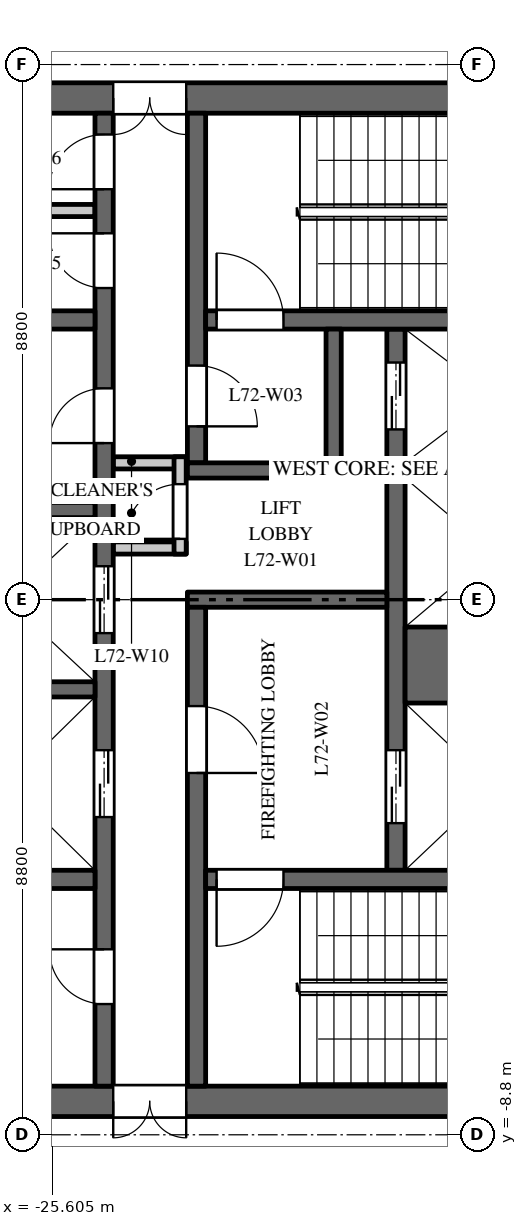
"""IFC4 building model, lengths in metres.
Left out: names, types, materials, properties, quantities, classifications, styles, units other than length and angle.
Written with IfcOpenShell. Run it as: python <this file> out.ifc"""

import sys

from ifc_helpers import new_model, si_unit, direction, frame, frame_2d, origin, place, context, subcontext, project, spatial, rectangle, extrude, element, fill, save


model = new_model("IFC4")
c1 = context("Model", 3, precision=1e-05, world=origin(), true_north=direction((0.0, 1.0)))
c2 = subcontext(c1, "Body", "Model", "MODEL_VIEW")
j1 = project(units=[si_unit("LENGTHUNIT", "METRE"), si_unit("PLANEANGLEUNIT", "RADIAN")], contexts=[c1])
p1 = place(None, origin())
s1 = spatial("IfcSite", under=j1, at=p1, CompositionType="ELEMENT")
p2 = place(p1, origin())
s2 = spatial("IfcBuilding", under=s1, at=p2, CompositionType="ELEMENT")
p3 = place(p2, frame((0.0, 0.0, 331.0)))
s3 = spatial("IfcBuildingStorey", under=s2, at=p3, CompositionType="ELEMENT", Elevation=331.0)
p4 = place(p3, frame((-16.5, 8.25, 0.0), z_axis=(0.0, 0.0, 1.0), x_axis=(-1.0, 0.0, 0.0)))
e1 = element("IfcWall", 1, at=p4, inside=s3, PredefinedType="SHEAR", context=c2, shape_type="SweptSolid", body=[
    extrude(rectangle(XDim=15.5, YDim=0.5, at=frame_2d((7.75, 0.0))), origin(), (0.0, 0.0, 1.0), 3.7),
])
p5 = place(p4, frame((6.9, 0.0, 0.0)))
e2 = element("IfcOpeningElement", 2, at=p5, cuts=e1, PredefinedType="OPENING", context=c2, shape_type="SweptSolid", body=[
    extrude(rectangle(XDim=1.2, YDim=2.1, at=frame_2d((0.6, 1.05))), frame((0.0, 0.26, 0.0), z_axis=(0.0, -1.0, 0.0), x_axis=(1.0, 0.0, 0.0)), (0.0, 0.0, 1.0), 0.52),
])
p6 = place(p4, frame((12.275, 0.0, 0.0)))
e3 = element("IfcOpeningElement", 3, at=p6, cuts=e1, PredefinedType="OPENING", context=c2, shape_type="SweptSolid", body=[
    extrude(rectangle(XDim=0.9, YDim=2.1, at=frame_2d((0.45, 1.05))), frame((0.0, 0.26, 0.0), z_axis=(0.0, -1.0, 0.0), x_axis=(1.0, 0.0, 0.0)), (0.0, 0.0, 1.0), 0.52),
])
p7 = place(p3, frame((-16.5, -8.25, 0.0), z_axis=(0.0, 0.0, 1.0), x_axis=(-1.0, 0.0, 0.0)))
e4 = element("IfcWall", 4, at=p7, inside=s3, PredefinedType="SHEAR", context=c2, shape_type="SweptSolid", body=[
    extrude(rectangle(XDim=15.5, YDim=0.5, at=frame_2d((7.75, 0.0))), origin(), (0.0, 0.0, 1.0), 3.7),
])
p8 = place(p7, frame((6.9, 0.0, 0.0)))
e5 = element("IfcOpeningElement", 5, at=p8, cuts=e4, PredefinedType="OPENING", context=c2, shape_type="SweptSolid", body=[
    extrude(rectangle(XDim=1.2, YDim=2.1, at=frame_2d((0.6, 1.05))), frame((0.0, 0.26, 0.0), z_axis=(0.0, -1.0, 0.0), x_axis=(1.0, 0.0, 0.0)), (0.0, 0.0, 1.0), 0.52),
])
p9 = place(p7, frame((12.425, 0.0, 0.0)))
e6 = element("IfcOpeningElement", 6, at=p9, cuts=e4, PredefinedType="OPENING", context=c2, shape_type="SweptSolid", body=[
    extrude(rectangle(XDim=0.9, YDim=2.1, at=frame_2d((0.45, 1.05))), frame((0.0, 0.26, 0.0), z_axis=(0.0, -1.0, 0.0), x_axis=(1.0, 0.0, 0.0)), (0.0, 0.0, 1.0), 0.52),
])
p10 = place(p3, frame((-19.95, -4.45, 0.0), z_axis=(0.0, 0.0, 1.0), x_axis=(0.0, 1.0, 0.0)))
e7 = element("IfcWall", 7, at=p10, inside=s3, PredefinedType="SHEAR", context=c2, shape_type="SweptSolid", body=[
    extrude(rectangle(XDim=8.9, YDim=0.3, at=frame_2d((4.45, 0.0))), origin(), (0.0, 0.0, 1.0), 3.7),
])
p11 = place(p10, frame((0.775, 0.0, 0.0)))
e8 = element("IfcOpeningElement", 8, at=p11, cuts=e7, PredefinedType="OPENING", context=c2, shape_type="SweptSolid", body=[
    extrude(rectangle(XDim=1.2, YDim=2.1, at=frame_2d((0.6, 1.05))), frame((0.0, 0.16, 0.0), z_axis=(0.0, -1.0, 0.0), x_axis=(1.0, 0.0, 0.0)), (0.0, 0.0, 1.0), 0.32),
])
p12 = place(p10, frame((7.25, 0.0, 0.0)))
e9 = element("IfcOpeningElement", 9, at=p12, cuts=e7, PredefinedType="OPENING", context=c2, shape_type="SweptSolid", body=[
    extrude(rectangle(XDim=1.1, YDim=2.1, at=frame_2d((0.55, 1.05))), frame((0.0, 0.16, 0.0), z_axis=(0.0, -1.0, 0.0), x_axis=(1.0, 0.0, 0.0)), (0.0, 0.0, 1.0), 0.32),
])
p13 = place(p3, frame((-24.75, -8.0, 0.0), z_axis=(0.0, 0.0, 1.0), x_axis=(0.0, 1.0, 0.0)))
e10 = element("IfcWall", 10, at=p13, inside=s3, PredefinedType="SHEAR", context=c2, shape_type="SweptSolid", body=[
    extrude(rectangle(XDim=16.0, YDim=0.3, at=frame_2d((8.0, 0.0))), origin(), (0.0, 0.0, 1.0), 3.7),
])
p14 = place(p13, frame((4.425, 0.0, 0.0)))
e11 = element("IfcOpeningElement", 11, at=p14, cuts=e10, PredefinedType="OPENING", context=c2, shape_type="SweptSolid", body=[
    extrude(rectangle(XDim=1.1, YDim=2.1, at=frame_2d((0.55, 1.05))), frame((0.0, 0.16, 0.0), z_axis=(0.0, -1.0, 0.0), x_axis=(1.0, 0.0, 0.0)), (0.0, 0.0, 1.0), 0.32),
])
p15 = place(p13, frame((7.45, 0.0, 0.0)))
e12 = element("IfcOpeningElement", 12, at=p15, cuts=e10, PredefinedType="OPENING", context=c2, shape_type="SweptSolid", body=[
    extrude(rectangle(XDim=1.1, YDim=2.1, at=frame_2d((0.55, 1.05))), frame((0.0, 0.16, 0.0), z_axis=(0.0, -1.0, 0.0), x_axis=(1.0, 0.0, 0.0)), (0.0, 0.0, 1.0), 0.32),
])
p16 = place(p13, frame((10.575, 0.0, 0.0)))
e13 = element("IfcOpeningElement", 13, at=p16, cuts=e10, PredefinedType="OPENING", context=c2, shape_type="SweptSolid", body=[
    extrude(rectangle(XDim=0.9, YDim=2.1, at=frame_2d((0.45, 1.05))), frame((0.0, 0.16, 0.0), z_axis=(0.0, -1.0, 0.0), x_axis=(1.0, 0.0, 0.0)), (0.0, 0.0, 1.0), 0.32),
])
p17 = place(p13, frame((13.125, 0.0, 0.0)))
e14 = element("IfcOpeningElement", 14, at=p17, cuts=e10, PredefinedType="OPENING", context=c2, shape_type="SweptSolid", body=[
    extrude(rectangle(XDim=0.9, YDim=2.1, at=frame_2d((0.45, 1.05))), frame((0.0, 0.16, 0.0), z_axis=(0.0, -1.0, 0.0), x_axis=(1.0, 0.0, 0.0)), (0.0, 0.0, 1.0), 0.32),
])
p18 = place(p13, frame((14.75, 0.0, 0.0)))
e15 = element("IfcOpeningElement", 15, at=p18, cuts=e10, PredefinedType="OPENING", context=c2, shape_type="SweptSolid", body=[
    extrude(rectangle(XDim=0.9, YDim=2.1, at=frame_2d((0.45, 1.05))), frame((0.0, 0.16, 0.0), z_axis=(0.0, -1.0, 0.0), x_axis=(1.0, 0.0, 0.0)), (0.0, 0.0, 1.0), 0.32),
])
p19 = place(p13, frame((1.35, 0.0, 0.0)))
e16 = element("IfcOpeningElement", 16, at=p19, cuts=e10, PredefinedType="OPENING", context=c2, shape_type="SweptSolid", body=[
    extrude(rectangle(XDim=0.9, YDim=2.1, at=frame_2d((0.45, 1.05))), frame((0.0, 0.16, 0.0), z_axis=(0.0, -1.0, 0.0), x_axis=(1.0, 0.0, 0.0)), (0.0, 0.0, 1.0), 0.32),
])
p20 = place(p3, frame((-20.1, 0.0, 0.0), z_axis=(0.0, 0.0, 1.0), x_axis=(-1.0, 0.0, 0.0)))
e17 = element("IfcWall", 17, at=p20, inside=s3, PredefinedType="SHEAR", context=c2, shape_type="SweptSolid", body=[
    extrude(rectangle(XDim=3.28, YDim=0.25, at=frame_2d((1.64, 0.0))), origin(), (0.0, 0.0, 1.0), 3.7),
])
for number, where, z_axis, x_axis in (
    (18, (-23.4, 0.85, 0.0), (0.0, 0.0, 1.0), (-1.0, 0.0, 0.0)),
    (19, (-23.4, 2.25, 0.0), (0.0, 0.0, 1.0), (-1.0, 0.0, 0.0)),
):
    element("IfcWall", number, at=place(p3, frame(where, z_axis=z_axis, x_axis=x_axis)), inside=s3, PredefinedType="PARTITIONING", context=c2, shape_type="SweptSolid", body=[
        extrude(rectangle(XDim=1.2, YDim=0.2, at=frame_2d((0.6, 0.0))), origin(), (0.0, 0.0, 1.0), 3.7),
    ])
p21 = place(p3, frame((-23.5, 0.75, 0.0), z_axis=(0.0, 0.0, 1.0), x_axis=(0.0, 1.0, 0.0)))
e20 = element("IfcWall", 20, at=p21, inside=s3, PredefinedType="PARTITIONING", context=c2, shape_type="SweptSolid", body=[
    extrude(rectangle(XDim=1.6, YDim=0.2, at=frame_2d((0.8, 0.0))), origin(), (0.0, 0.0, 1.0), 3.7),
])
p22 = place(p21, frame((0.25, 0.0, 0.0)))
e21 = element("IfcOpeningElement", 21, at=p22, cuts=e20, PredefinedType="OPENING", context=c2, shape_type="SweptSolid", body=[
    extrude(rectangle(XDim=0.9, YDim=2.1, at=frame_2d((0.45, 1.05))), frame((0.0, 0.11, 0.0), z_axis=(0.0, -1.0, 0.0), x_axis=(1.0, 0.0, 0.0)), (0.0, 0.0, 1.0), 0.22),
])
p23 = place(p3, frame((-24.9, 4.6, 0.0), z_axis=(0.0, 0.0, 1.0), x_axis=(-1.0, 0.0, 0.0)))
e22 = element("IfcWall", 22, at=p23, inside=s3, PredefinedType="SHEAR", context=c2, shape_type="SweptSolid", body=[
    extrude(rectangle(XDim=6.1, YDim=0.3, at=frame_2d((3.05, 0.0))), origin(), (0.0, 0.0, 1.0), 3.7),
])
p24 = place(p3, frame((-24.9, 6.4, 0.0), z_axis=(0.0, 0.0, 1.0), x_axis=(-1.0, 0.0, 0.0)))
e23 = element("IfcWall", 23, at=p24, inside=s3, PredefinedType="PARTITIONING", context=c2, shape_type="SweptSolid", body=[
    extrude(rectangle(XDim=2.35, YDim=0.2, at=frame_2d((1.175, 0.0))), origin(), (0.0, 0.0, 1.0), 3.7),
])
p25 = place(p3, frame((-24.9, -4.6, 0.0), z_axis=(0.0, 0.0, 1.0), x_axis=(-1.0, 0.0, 0.0)))
e24 = element("IfcWall", 24, at=p25, inside=s3, PredefinedType="SHEAR", context=c2, shape_type="SweptSolid", body=[
    extrude(rectangle(XDim=6.1, YDim=0.3, at=frame_2d((3.05, 0.0))), origin(), (0.0, 0.0, 1.0), 3.7),
])
p26 = place(p25, frame((4.2, 0.0, 0.0)))
e25 = element("IfcOpeningElement", 25, at=p26, cuts=e24, PredefinedType="OPENING", context=c2, shape_type="SweptSolid", body=[
    extrude(rectangle(XDim=0.9, YDim=2.1, at=frame_2d((0.45, 1.05))), frame((0.0, 0.16, 0.0), z_axis=(0.0, -1.0, 0.0), x_axis=(1.0, 0.0, 0.0)), (0.0, 0.0, 1.0), 0.32),
])
p27 = place(p3, frame((-16.9, -1.075, 0.0), z_axis=(0.0, 0.0, 1.0), x_axis=(-1.0, 0.0, 0.0)))
e26 = element("IfcWall", 26, at=p27, inside=s3, PredefinedType="SHEAR", context=c2, shape_type="SweptSolid", body=[
    extrude(rectangle(XDim=2.9, YDim=1.25, at=frame_2d((1.45, 0.0))), origin(), (0.0, 0.0, 1.0), 3.7),
])
for number, where, z_axis, x_axis in (
    (27, (-16.9, 2.125, 0.0), (0.0, 0.0, 1.0), (-1.0, 0.0, 0.0)),
    (28, (-24.9, -1.475, 0.0), (0.0, 0.0, 1.0), (-1.0, 0.0, 0.0)),
    (29, (-24.9, 1.475, 0.0), (0.0, 0.0, 1.0), (-1.0, 0.0, 0.0)),
):
    element("IfcWall", number, at=place(p3, frame(where, z_axis=z_axis, x_axis=x_axis)), inside=s3, PredefinedType="SHEAR", context=c2, shape_type="SweptSolid", body=[
        extrude(rectangle(XDim=2.9, YDim=0.25, at=frame_2d((1.45, 0.0))), origin(), (0.0, 0.0, 1.0), 3.7),
    ])
p28 = place(p3, frame((-23.23, 2.25, 0.0), z_axis=(0.0, 0.0, 1.0), x_axis=(0.0, 1.0, 0.0)))
e30 = element("IfcWall", 30, at=p28, inside=s3, PredefinedType="SHEAR", context=c2, shape_type="SweptSolid", body=[
    extrude(rectangle(XDim=5.75, YDim=0.3, at=frame_2d((2.875, 0.0))), origin(), (0.0, 0.0, 1.0), 3.7),
])
p29 = place(p28, frame((0.6, 0.0, 0.0)))
e31 = element("IfcOpeningElement", 31, at=p29, cuts=e30, PredefinedType="OPENING", context=c2, shape_type="SweptSolid", body=[
    extrude(rectangle(XDim=1.0, YDim=2.1, at=frame_2d((0.5, 1.05))), frame((0.0, 0.16, 0.0), z_axis=(0.0, -1.0, 0.0), x_axis=(1.0, 0.0, 0.0)), (0.0, 0.0, 1.0), 0.32),
])
p30 = place(p3, frame((-23.23, -8.0, 0.0), z_axis=(0.0, 0.0, 1.0), x_axis=(0.0, 1.0, 0.0)))
e32 = element("IfcWall", 32, at=p30, inside=s3, PredefinedType="SHEAR", context=c2, shape_type="SweptSolid", body=[
    extrude(rectangle(XDim=7.875, YDim=0.3, at=frame_2d((3.938, 0.0))), origin(), (0.0, 0.0, 1.0), 3.7),
])
p31 = place(p30, frame((5.15, 0.0, 0.0)))
e33 = element("IfcOpeningElement", 33, at=p31, cuts=e32, PredefinedType="OPENING", context=c2, shape_type="SweptSolid", body=[
    extrude(rectangle(XDim=1.1, YDim=2.1, at=frame_2d((0.55, 1.05))), frame((0.0, 0.16, 0.0), z_axis=(0.0, -1.0, 0.0), x_axis=(1.0, 0.0, 0.0)), (0.0, 0.0, 1.0), 0.32),
])
p32 = place(p3, frame((-16.9, 4.6, 0.0), z_axis=(0.0, 0.0, 1.0), x_axis=(-1.0, 0.0, 0.0)))
e34 = element("IfcWall", 34, at=p32, inside=s3, PredefinedType="SHEAR", context=c2, shape_type="SweptSolid", body=[
    extrude(rectangle(XDim=6.18, YDim=0.3, at=frame_2d((3.09, 0.0))), origin(), (0.0, 0.0, 1.0), 3.7),
])
p33 = place(p32, frame((4.9, 0.0, 0.0)))
e35 = element("IfcOpeningElement", 35, at=p33, cuts=e34, PredefinedType="OPENING", context=c2, shape_type="SweptSolid", body=[
    extrude(rectangle(XDim=1.1, YDim=2.1, at=frame_2d((0.55, 1.05))), frame((0.0, 0.16, 0.0), z_axis=(0.0, -1.0, 0.0), x_axis=(1.0, 0.0, 0.0)), (0.0, 0.0, 1.0), 0.32),
])
p34 = place(p3, frame((-16.9, -4.6, 0.0), z_axis=(0.0, 0.0, 1.0), x_axis=(-1.0, 0.0, 0.0)))
e36 = element("IfcWall", 36, at=p34, inside=s3, PredefinedType="SHEAR", context=c2, shape_type="SweptSolid", body=[
    extrude(rectangle(XDim=6.18, YDim=0.3, at=frame_2d((3.09, 0.0))), origin(), (0.0, 0.0, 1.0), 3.7),
])
p35 = place(p34, frame((4.9, 0.0, 0.0)))
e37 = element("IfcOpeningElement", 37, at=p35, cuts=e36, PredefinedType="OPENING", context=c2, shape_type="SweptSolid", body=[
    extrude(rectangle(XDim=1.1, YDim=2.1, at=frame_2d((0.55, 1.05))), frame((0.0, 0.16, 0.0), z_axis=(0.0, -1.0, 0.0), x_axis=(1.0, 0.0, 0.0)), (0.0, 0.0, 1.0), 0.32),
])
p36 = place(p3, frame((-20.85, 2.125, 0.0), z_axis=(0.0, 0.0, 1.0), x_axis=(-1.0, 0.0, 0.0)))
e38 = element("IfcWall", 38, at=p36, inside=s3, PredefinedType="SHEAR", context=c2, shape_type="SweptSolid", body=[
    extrude(rectangle(XDim=2.53, YDim=0.25, at=frame_2d((1.265, 0.0))), origin(), (0.0, 0.0, 1.0), 3.7),
])
p37 = place(p3, frame((-20.975, 2.25, 0.0), z_axis=(0.0, 0.0, 1.0), x_axis=(0.0, 1.0, 0.0)))
e39 = element("IfcWall", 39, at=p37, inside=s3, PredefinedType="SHEAR", context=c2, shape_type="SweptSolid", body=[
    extrude(rectangle(XDim=2.2, YDim=0.25, at=frame_2d((1.1, 0.0))), origin(), (0.0, 0.0, 1.0), 3.7),
])
p38 = place(p11, origin())
e40 = element("IfcDoor", 40, at=p38, inside=s3, OperationType="DOUBLE_DOOR_SLIDING", PredefinedType="DOOR", context=c2, shape_type="SweptSolid", body=[
    extrude(rectangle(XDim=1.2, YDim=2.1, at=frame_2d((0.6, 1.05))), frame((0.0, 0.025, 0.0), z_axis=(0.0, -1.0, 0.0), x_axis=(1.0, 0.0, 0.0)), (0.0, 0.0, 1.0), 0.05),
])
fill(e8, e40)
p39 = place(p12, origin())
e41 = element("IfcDoor", 41, at=p39, inside=s3, OperationType="DOUBLE_DOOR_SLIDING", PredefinedType="DOOR", context=c2, shape_type="SweptSolid", body=[
    extrude(rectangle(XDim=1.1, YDim=2.1, at=frame_2d((0.55, 1.05))), frame((0.0, 0.025, 0.0), z_axis=(0.0, -1.0, 0.0), x_axis=(1.0, 0.0, 0.0)), (0.0, 0.0, 1.0), 0.05),
])
fill(e9, e41)
p40 = place(p14, origin())
e42 = element("IfcDoor", 42, at=p40, inside=s3, OperationType="DOUBLE_DOOR_SLIDING", PredefinedType="DOOR", context=c2, shape_type="SweptSolid", body=[
    extrude(rectangle(XDim=1.1, YDim=2.1, at=frame_2d((0.55, 1.05))), frame((0.0, 0.025, 0.0), z_axis=(0.0, -1.0, 0.0), x_axis=(1.0, 0.0, 0.0)), (0.0, 0.0, 1.0), 0.05),
])
fill(e11, e42)
p41 = place(p15, origin())
e43 = element("IfcDoor", 43, at=p41, inside=s3, OperationType="DOUBLE_DOOR_SLIDING", PredefinedType="DOOR", context=c2, shape_type="SweptSolid", body=[
    extrude(rectangle(XDim=1.1, YDim=2.1, at=frame_2d((0.55, 1.05))), frame((0.0, 0.025, 0.0), z_axis=(0.0, -1.0, 0.0), x_axis=(1.0, 0.0, 0.0)), (0.0, 0.0, 1.0), 0.05),
])
fill(e12, e43)
p42 = place(p33, origin())
e44 = element("IfcDoor", 44, at=p42, inside=s3, OperationType="SINGLE_SWING_RIGHT", PredefinedType="DOOR", context=c2, shape_type="SweptSolid", body=[
    extrude(rectangle(XDim=1.1, YDim=2.1, at=frame_2d((0.55, 1.05))), frame((0.0, 0.025, 0.0), z_axis=(0.0, -1.0, 0.0), x_axis=(1.0, 0.0, 0.0)), (0.0, 0.0, 1.0), 0.05),
])
fill(e35, e44)
p43 = place(p35, origin())
e45 = element("IfcDoor", 45, at=p43, inside=s3, OperationType="SINGLE_SWING_LEFT", PredefinedType="DOOR", context=c2, shape_type="SweptSolid", body=[
    extrude(rectangle(XDim=1.1, YDim=2.1, at=frame_2d((0.55, 1.05))), frame((0.0, 0.025, 0.0), z_axis=(0.0, -1.0, 0.0), x_axis=(1.0, 0.0, 0.0)), (0.0, 0.0, 1.0), 0.05),
])
fill(e37, e45)
p44 = place(p31, origin())
e46 = element("IfcDoor", 46, at=p44, inside=s3, OperationType="SINGLE_SWING_LEFT", PredefinedType="DOOR", context=c2, shape_type="SweptSolid", body=[
    extrude(rectangle(XDim=1.1, YDim=2.1, at=frame_2d((0.55, 1.05))), frame((0.0, 0.025, 0.0), z_axis=(0.0, -1.0, 0.0), x_axis=(1.0, 0.0, 0.0)), (0.0, 0.0, 1.0), 0.05),
])
fill(e33, e46)
p45 = place(p29, origin())
e47 = element("IfcDoor", 47, at=p45, inside=s3, OperationType="SINGLE_SWING_LEFT", PredefinedType="DOOR", context=c2, shape_type="SweptSolid", body=[
    extrude(rectangle(XDim=1.0, YDim=2.1, at=frame_2d((0.5, 1.05))), frame((0.0, 0.025, 0.0), z_axis=(0.0, -1.0, 0.0), x_axis=(1.0, 0.0, 0.0)), (0.0, 0.0, 1.0), 0.05),
])
fill(e31, e47)
p46 = place(p5, origin())
e48 = element("IfcDoor", 48, at=p46, inside=s3, OperationType="DOUBLE_DOOR_DOUBLE_SWING", PredefinedType="DOOR", context=c2, shape_type="SweptSolid", body=[
    extrude(rectangle(XDim=1.2, YDim=2.1, at=frame_2d((0.6, 1.05))), frame((0.0, 0.025, 0.0), z_axis=(0.0, -1.0, 0.0), x_axis=(1.0, 0.0, 0.0)), (0.0, 0.0, 1.0), 0.05),
])
fill(e2, e48)
p47 = place(p8, origin())
e49 = element("IfcDoor", 49, at=p47, inside=s3, OperationType="DOUBLE_DOOR_DOUBLE_SWING", PredefinedType="DOOR", context=c2, shape_type="SweptSolid", body=[
    extrude(rectangle(XDim=1.2, YDim=2.1, at=frame_2d((0.6, 1.05))), frame((0.0, 0.025, 0.0), z_axis=(0.0, -1.0, 0.0), x_axis=(1.0, 0.0, 0.0)), (0.0, 0.0, 1.0), 0.05),
])
fill(e5, e49)
p48 = place(p16, origin())
e50 = element("IfcDoor", 50, at=p48, inside=s3, OperationType="SINGLE_SWING_RIGHT", PredefinedType="DOOR", context=c2, shape_type="SweptSolid", body=[
    extrude(rectangle(XDim=0.9, YDim=2.1, at=frame_2d((0.45, 1.05))), frame((0.0, 0.025, 0.0), z_axis=(0.0, -1.0, 0.0), x_axis=(1.0, 0.0, 0.0)), (0.0, 0.0, 1.0), 0.05),
])
fill(e13, e50)
p49 = place(p17, origin())
e51 = element("IfcDoor", 51, at=p49, inside=s3, OperationType="SINGLE_SWING_LEFT", PredefinedType="DOOR", context=c2, shape_type="SweptSolid", body=[
    extrude(rectangle(XDim=0.9, YDim=2.1, at=frame_2d((0.45, 1.05))), frame((0.0, 0.025, 0.0), z_axis=(0.0, -1.0, 0.0), x_axis=(1.0, 0.0, 0.0)), (0.0, 0.0, 1.0), 0.05),
])
fill(e14, e51)
p50 = place(p18, origin())
e52 = element("IfcDoor", 52, at=p50, inside=s3, OperationType="SINGLE_SWING_RIGHT", PredefinedType="DOOR", context=c2, shape_type="SweptSolid", body=[
    extrude(rectangle(XDim=0.9, YDim=2.1, at=frame_2d((0.45, 1.05))), frame((0.0, 0.025, 0.0), z_axis=(0.0, -1.0, 0.0), x_axis=(1.0, 0.0, 0.0)), (0.0, 0.0, 1.0), 0.05),
])
fill(e15, e52)
p51 = place(p19, origin())
e53 = element("IfcDoor", 53, at=p51, inside=s3, OperationType="SINGLE_SWING_LEFT", PredefinedType="DOOR", context=c2, shape_type="SweptSolid", body=[
    extrude(rectangle(XDim=0.9, YDim=2.1, at=frame_2d((0.45, 1.05))), frame((0.0, 0.025, 0.0), z_axis=(0.0, -1.0, 0.0), x_axis=(1.0, 0.0, 0.0)), (0.0, 0.0, 1.0), 0.05),
])
fill(e16, e53)
p52 = place(p22, origin())
e54 = element("IfcDoor", 54, at=p52, inside=s3, OperationType="SINGLE_SWING_RIGHT", PredefinedType="DOOR", context=c2, shape_type="SweptSolid", body=[
    extrude(rectangle(XDim=0.9, YDim=2.1, at=frame_2d((0.45, 1.05))), frame((0.0, 0.025, 0.0), z_axis=(0.0, -1.0, 0.0), x_axis=(1.0, 0.0, 0.0)), (0.0, 0.0, 1.0), 0.05),
])
fill(e21, e54)
save(model, sys.argv[1])
